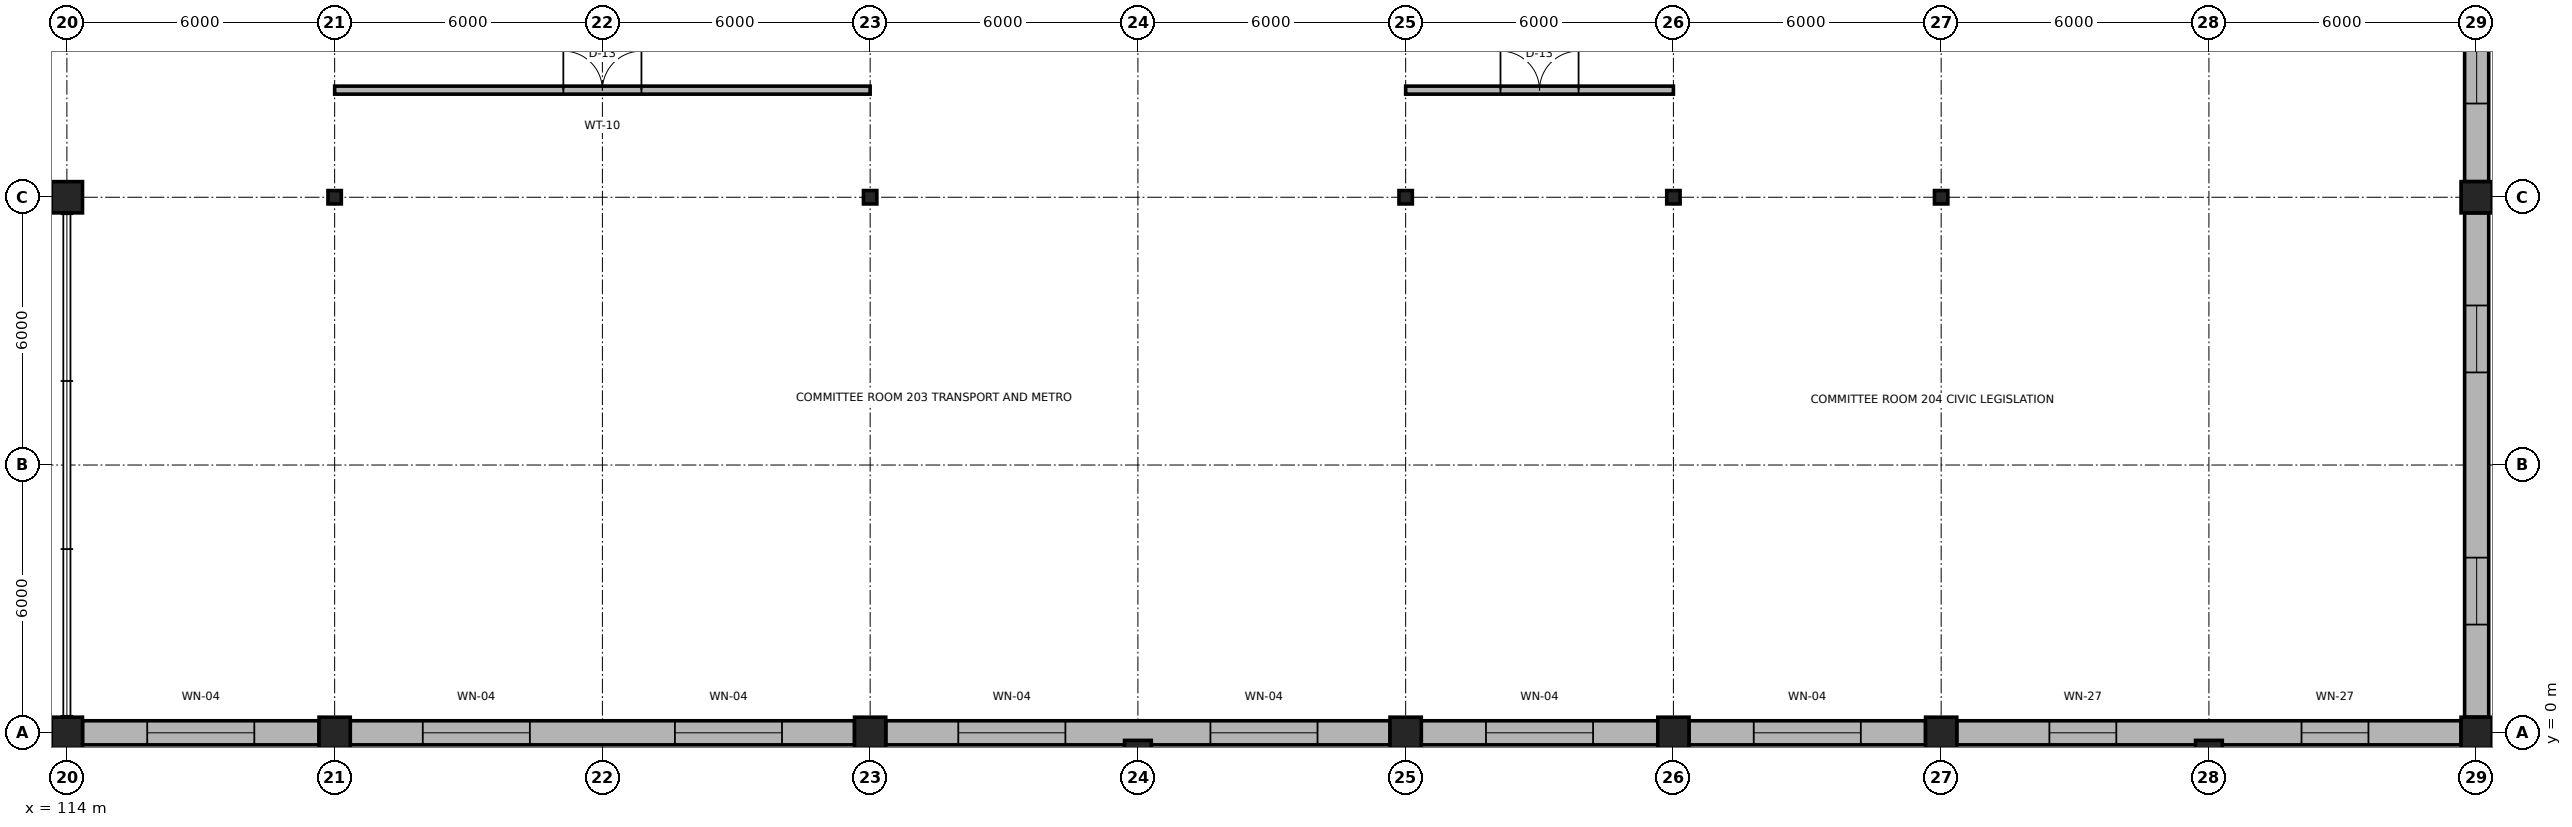
"""IFC4 building model, lengths in metres.
Left out: names, types, materials, properties, quantities, classifications, styles, units other than length and angle.
Written with IfcOpenShell. Run it as: python <this file> out.ifc"""

import sys

from ifc_helpers import new_model, si_unit, direction, frame, frame_2d, origin, origin_2d, place, context, subcontext, project, spatial, rectangle, i_section, extrude, element, fill, save


model = new_model("IFC4")
c1 = context("Model", 3, precision=1e-05, world=origin(), true_north=direction((0.0, 1.0)))
c2 = subcontext(c1, "Body", "Model", "MODEL_VIEW")
j1 = project(units=[si_unit("LENGTHUNIT", "METRE"), si_unit("PLANEANGLEUNIT", "RADIAN")], contexts=[c1])
p1 = place(None, origin())
s1 = spatial("IfcSite", under=j1, at=p1, CompositionType="ELEMENT")
p2 = place(p1, origin())
s2 = spatial("IfcBuilding", under=s1, at=p2, CompositionType="ELEMENT")
p3 = place(p2, frame((0.0, 0.0, 6.0)))
s3 = spatial("IfcBuildingStorey", under=s2, at=p3, CompositionType="ELEMENT", Elevation=6.0)
for number, where, z_axis, x_axis in (
    (1, (114.0, 0.0, 0.0), (0.0, 0.0, 1.0), (1.0, 0.0, 0.0)),
    (2, (120.0, 0.0, 0.0), (0.0, 0.0, 1.0), (1.0, 0.0, 0.0)),
    (3, (132.0, 0.0, 0.0), (0.0, 0.0, 1.0), (1.0, 0.0, 0.0)),
    (4, (144.0, 0.0, 0.0), (0.0, 0.0, 1.0), (1.0, 0.0, 0.0)),
    (5, (150.0, 0.0, 0.0), (0.0, 0.0, 1.0), (1.0, 0.0, 0.0)),
    (6, (156.0, 0.0, 0.0), (0.0, 0.0, 1.0), (1.0, 0.0, 0.0)),
    (7, (168.0, 0.0, 0.0), (0.0, 0.0, 1.0), (1.0, 0.0, 0.0)),
    (8, (114.0, 12.0, 0.0), (0.0, 0.0, 1.0), (1.0, 0.0, 0.0)),
):
    element("IfcColumn", number, at=place(p3, frame(where, z_axis=z_axis, x_axis=x_axis)), inside=s3, PredefinedType="COLUMN", context=c2, shape_type="SweptSolid", body=[
        extrude(rectangle(XDim=0.7, YDim=0.7, at=origin_2d()), origin(), (0.0, 0.0, 1.0), 6.0),
    ])
for number, where, z_axis, x_axis in (
    (9, (120.0, 12.0, 0.0), (0.0, 0.0, 1.0), (1.0, 0.0, 0.0)),
    (10, (132.0, 12.0, 0.0), (0.0, 0.0, 1.0), (1.0, 0.0, 0.0)),
    (11, (144.0, 12.0, 0.0), (0.0, 0.0, 1.0), (1.0, 0.0, 0.0)),
    (12, (150.0, 12.0, 0.0), (0.0, 0.0, 1.0), (1.0, 0.0, 0.0)),
    (13, (156.0, 12.0, 0.0), (0.0, 0.0, 1.0), (1.0, 0.0, 0.0)),
):
    element("IfcColumn", number, at=place(p3, frame(where, z_axis=z_axis, x_axis=x_axis)), inside=s3, PredefinedType="COLUMN", context=c2, shape_type="SweptSolid", body=[
        extrude(i_section(OverallWidth=0.3, OverallDepth=0.3, WebThickness=0.01, FlangeThickness=0.015, FilletRadius=0.018, at=origin_2d()), origin(), (0.0, 0.0, 1.0), 6.0),
    ])
p4 = place(p3, frame((168.0, 12.0, 0.0), z_axis=(0.0, 0.0, 1.0), x_axis=(1.0, 0.0, 0.0)))
e14 = element("IfcColumn", 14, at=p4, inside=s3, PredefinedType="COLUMN", context=c2, shape_type="SweptSolid", body=[
    extrude(rectangle(XDim=0.7, YDim=0.7, at=origin_2d()), origin(), (0.0, 0.0, 1.0), 6.0),
])
for number, where, z_axis, x_axis in (
    (15, (138.0, -0.35, 0.0), (0.0, 0.0, 1.0), (1.0, 0.0, 0.0)),
    (16, (162.0, -0.35, 0.0), (0.0, 0.0, 1.0), (1.0, 0.0, 0.0)),
):
    element("IfcColumn", number, at=place(p3, frame(where, z_axis=z_axis, x_axis=x_axis)), inside=s3, PredefinedType="PILASTER", context=c2, shape_type="SweptSolid", body=[
        extrude(rectangle(XDim=0.6, YDim=0.36, at=origin_2d()), origin(), (0.0, 0.0, 1.0), 6.0),
    ])
p5 = place(p3, frame((114.35, 0.0, 0.0), z_axis=(0.0, 0.0, 1.0), x_axis=(1.0, 0.0, 0.0)))
e17 = element("IfcWall", 17, at=p5, inside=s3, PredefinedType="SOLIDWALL", context=c2, shape_type="SweptSolid", body=[
    extrude(rectangle(XDim=5.3, YDim=0.54, at=frame_2d((2.65, 0.0))), origin(), (0.0, 0.0, 1.0), 5.31),
])
p6 = place(p5, frame((1.45, 0.0, 0.85)))
e18 = element("IfcOpeningElement", 18, at=p6, cuts=e17, PredefinedType="OPENING", context=c2, shape_type="SweptSolid", body=[
    extrude(rectangle(XDim=2.4, YDim=3.8, at=frame_2d((1.2, 1.9))), frame((0.0, 0.285, 0.0), z_axis=(0.0, -1.0, 0.0), x_axis=(1.0, 0.0, 0.0)), (0.0, 0.0, 1.0), 0.57),
])
p7 = place(p3, frame((120.35, 0.0, 0.0), z_axis=(0.0, 0.0, 1.0), x_axis=(1.0, 0.0, 0.0)))
e19 = element("IfcWall", 19, at=p7, inside=s3, PredefinedType="SOLIDWALL", context=c2, shape_type="SweptSolid", body=[
    extrude(rectangle(XDim=11.3, YDim=0.54, at=frame_2d((5.65, 0.0))), origin(), (0.0, 0.0, 1.0), 5.31),
])
p8 = place(p7, frame((1.625, 0.0, 0.85)))
e20 = element("IfcOpeningElement", 20, at=p8, cuts=e19, PredefinedType="OPENING", context=c2, shape_type="SweptSolid", body=[
    extrude(rectangle(XDim=2.4, YDim=3.8, at=frame_2d((1.2, 1.9))), frame((0.0, 0.285, 0.0), z_axis=(0.0, -1.0, 0.0), x_axis=(1.0, 0.0, 0.0)), (0.0, 0.0, 1.0), 0.57),
])
p9 = place(p7, frame((7.275, 0.0, 0.85)))
e21 = element("IfcOpeningElement", 21, at=p9, cuts=e19, PredefinedType="OPENING", context=c2, shape_type="SweptSolid", body=[
    extrude(rectangle(XDim=2.4, YDim=3.8, at=frame_2d((1.2, 1.9))), frame((0.0, 0.285, 0.0), z_axis=(0.0, -1.0, 0.0), x_axis=(1.0, 0.0, 0.0)), (0.0, 0.0, 1.0), 0.57),
])
p10 = place(p3, frame((132.35, 0.0, 0.0), z_axis=(0.0, 0.0, 1.0), x_axis=(1.0, 0.0, 0.0)))
e22 = element("IfcWall", 22, at=p10, inside=s3, PredefinedType="SOLIDWALL", context=c2, shape_type="SweptSolid", body=[
    extrude(rectangle(XDim=11.3, YDim=0.54, at=frame_2d((5.65, 0.0))), origin(), (0.0, 0.0, 1.0), 5.31),
])
p11 = place(p10, frame((1.625, 0.0, 0.85)))
e23 = element("IfcOpeningElement", 23, at=p11, cuts=e22, PredefinedType="OPENING", context=c2, shape_type="SweptSolid", body=[
    extrude(rectangle(XDim=2.4, YDim=3.8, at=frame_2d((1.2, 1.9))), frame((0.0, 0.285, 0.0), z_axis=(0.0, -1.0, 0.0), x_axis=(1.0, 0.0, 0.0)), (0.0, 0.0, 1.0), 0.57),
])
p12 = place(p10, frame((7.275, 0.0, 0.85)))
e24 = element("IfcOpeningElement", 24, at=p12, cuts=e22, PredefinedType="OPENING", context=c2, shape_type="SweptSolid", body=[
    extrude(rectangle(XDim=2.4, YDim=3.8, at=frame_2d((1.2, 1.9))), frame((0.0, 0.285, 0.0), z_axis=(0.0, -1.0, 0.0), x_axis=(1.0, 0.0, 0.0)), (0.0, 0.0, 1.0), 0.57),
])
p13 = place(p3, frame((144.35, 0.0, 0.0), z_axis=(0.0, 0.0, 1.0), x_axis=(1.0, 0.0, 0.0)))
e25 = element("IfcWall", 25, at=p13, inside=s3, PredefinedType="SOLIDWALL", context=c2, shape_type="SweptSolid", body=[
    extrude(rectangle(XDim=5.3, YDim=0.54, at=frame_2d((2.65, 0.0))), origin(), (0.0, 0.0, 1.0), 5.31),
])
p14 = place(p13, frame((1.45, 0.0, 0.85)))
e26 = element("IfcOpeningElement", 26, at=p14, cuts=e25, PredefinedType="OPENING", context=c2, shape_type="SweptSolid", body=[
    extrude(rectangle(XDim=2.4, YDim=3.8, at=frame_2d((1.2, 1.9))), frame((0.0, 0.285, 0.0), z_axis=(0.0, -1.0, 0.0), x_axis=(1.0, 0.0, 0.0)), (0.0, 0.0, 1.0), 0.57),
])
p15 = place(p3, frame((150.35, 0.0, 0.0), z_axis=(0.0, 0.0, 1.0), x_axis=(1.0, 0.0, 0.0)))
e27 = element("IfcWall", 27, at=p15, inside=s3, PredefinedType="SOLIDWALL", context=c2, shape_type="SweptSolid", body=[
    extrude(rectangle(XDim=5.3, YDim=0.54, at=frame_2d((2.65, 0.0))), origin(), (0.0, 0.0, 1.0), 5.31),
])
p16 = place(p15, frame((1.45, 0.0, 0.85)))
e28 = element("IfcOpeningElement", 28, at=p16, cuts=e27, PredefinedType="OPENING", context=c2, shape_type="SweptSolid", body=[
    extrude(rectangle(XDim=2.4, YDim=3.8, at=frame_2d((1.2, 1.9))), frame((0.0, 0.285, 0.0), z_axis=(0.0, -1.0, 0.0), x_axis=(1.0, 0.0, 0.0)), (0.0, 0.0, 1.0), 0.57),
])
p17 = place(p3, frame((156.35, 0.0, 0.0), z_axis=(0.0, 0.0, 1.0), x_axis=(1.0, 0.0, 0.0)))
e29 = element("IfcWall", 29, at=p17, inside=s3, PredefinedType="SOLIDWALL", context=c2, shape_type="SweptSolid", body=[
    extrude(rectangle(XDim=11.3, YDim=0.54, at=frame_2d((5.65, 0.0))), origin(), (0.0, 0.0, 1.0), 5.31),
])
p18 = place(p17, frame((2.075, 0.0, 0.85)))
e30 = element("IfcOpeningElement", 30, at=p18, cuts=e29, PredefinedType="OPENING", context=c2, shape_type="SweptSolid", body=[
    extrude(rectangle(XDim=1.5, YDim=2.8, at=frame_2d((0.75, 1.4))), frame((0.0, 0.285, 0.0), z_axis=(0.0, -1.0, 0.0), x_axis=(1.0, 0.0, 0.0)), (0.0, 0.0, 1.0), 0.57),
])
p19 = place(p17, frame((7.725, 0.0, 0.85)))
e31 = element("IfcOpeningElement", 31, at=p19, cuts=e29, PredefinedType="OPENING", context=c2, shape_type="SweptSolid", body=[
    extrude(rectangle(XDim=1.5, YDim=2.8, at=frame_2d((0.75, 1.4))), frame((0.0, 0.285, 0.0), z_axis=(0.0, -1.0, 0.0), x_axis=(1.0, 0.0, 0.0)), (0.0, 0.0, 1.0), 0.57),
])
p20 = place(p3, frame((168.0, 0.35, 0.0), z_axis=(0.0, 0.0, 1.0), x_axis=(0.0, 1.0, 0.0)))
e32 = element("IfcWall", 32, at=p20, inside=s3, PredefinedType="SOLIDWALL", context=c2, shape_type="SweptSolid", body=[
    extrude(rectangle(XDim=11.3, YDim=0.54, at=frame_2d((5.65, 0.0))), origin(), (0.0, 0.0, 1.0), 5.31),
])
p21 = place(p20, frame((2.075, 0.0, 0.85)))
e33 = element("IfcOpeningElement", 33, at=p21, cuts=e32, PredefinedType="OPENING", context=c2, shape_type="SweptSolid", body=[
    extrude(rectangle(XDim=1.5, YDim=2.8, at=frame_2d((0.75, 1.4))), frame((0.0, 0.285, 0.0), z_axis=(0.0, -1.0, 0.0), x_axis=(1.0, 0.0, 0.0)), (0.0, 0.0, 1.0), 0.57),
])
p22 = place(p20, frame((7.725, 0.0, 0.85)))
e34 = element("IfcOpeningElement", 34, at=p22, cuts=e32, PredefinedType="OPENING", context=c2, shape_type="SweptSolid", body=[
    extrude(rectangle(XDim=1.5, YDim=2.8, at=frame_2d((0.75, 1.4))), frame((0.0, 0.285, 0.0), z_axis=(0.0, -1.0, 0.0), x_axis=(1.0, 0.0, 0.0)), (0.0, 0.0, 1.0), 0.57),
])
p23 = place(p3, frame((168.0, 12.35, 0.0), z_axis=(0.0, 0.0, 1.0), x_axis=(0.0, 1.0, 0.0)))
e35 = element("IfcWall", 35, at=p23, inside=s3, PredefinedType="SOLIDWALL", context=c2, shape_type="SweptSolid", body=[
    extrude(rectangle(XDim=5.3, YDim=0.54, at=frame_2d((2.65, 0.0))), origin(), (0.0, 0.0, 1.0), 5.31),
])
p24 = place(p23, frame((1.75, 0.0, 0.85)))
e36 = element("IfcOpeningElement", 36, at=p24, cuts=e35, PredefinedType="OPENING", context=c2, shape_type="SweptSolid", body=[
    extrude(rectangle(XDim=1.8, YDim=3.3, at=frame_2d((0.9, 1.65))), frame((0.0, 0.285, 0.0), z_axis=(0.0, -1.0, 0.0), x_axis=(1.0, 0.0, 0.0)), (0.0, 0.0, 1.0), 0.57),
])
p25 = place(p3, frame((120.0, 14.4, 0.0), z_axis=(0.0, 0.0, 1.0), x_axis=(1.0, 0.0, 0.0)))
e37 = element("IfcWall", 37, at=p25, inside=s3, PredefinedType="PARTITIONING", context=c2, shape_type="SweptSolid", body=[
    extrude(rectangle(XDim=12.0, YDim=0.18, at=frame_2d((6.0, 0.0))), origin(), (0.0, 0.0, 1.0), 5.76),
])
p26 = place(p25, frame((5.125, 0.0, 0.0)))
e38 = element("IfcOpeningElement", 38, at=p26, cuts=e37, PredefinedType="OPENING", context=c2, shape_type="SweptSolid", body=[
    extrude(rectangle(XDim=1.75, YDim=2.55, at=frame_2d((0.875, 1.275))), frame((0.0, 0.105, 0.0), z_axis=(0.0, -1.0, 0.0), x_axis=(1.0, 0.0, 0.0)), (0.0, 0.0, 1.0), 0.21),
])
p27 = place(p3, frame((144.0, 14.4, 0.0), z_axis=(0.0, 0.0, 1.0), x_axis=(1.0, 0.0, 0.0)))
e39 = element("IfcWall", 39, at=p27, inside=s3, PredefinedType="PARTITIONING", context=c2, shape_type="SweptSolid", body=[
    extrude(rectangle(XDim=6.0, YDim=0.18, at=frame_2d((3.0, 0.0))), origin(), (0.0, 0.0, 1.0), 5.76),
])
p28 = place(p27, frame((2.125, 0.0, 0.0)))
e40 = element("IfcOpeningElement", 40, at=p28, cuts=e39, PredefinedType="OPENING", context=c2, shape_type="SweptSolid", body=[
    extrude(rectangle(XDim=1.75, YDim=2.55, at=frame_2d((0.875, 1.275))), frame((0.0, 0.105, 0.0), z_axis=(0.0, -1.0, 0.0), x_axis=(1.0, 0.0, 0.0)), (0.0, 0.0, 1.0), 0.21),
])
p29 = place(p6, origin())
e41 = element("IfcWindow", 41, at=p29, inside=s3, PartitioningType="SINGLE_PANEL", PredefinedType="WINDOW", context=c2, shape_type="SweptSolid", body=[
    extrude(rectangle(XDim=2.4, YDim=3.8, at=frame_2d((1.2, 1.9))), frame((0.0, 0.03, 0.0), z_axis=(0.0, -1.0, 0.0), x_axis=(1.0, 0.0, 0.0)), (0.0, 0.0, 1.0), 0.06),
])
fill(e18, e41)
p30 = place(p8, origin())
e42 = element("IfcWindow", 42, at=p30, inside=s3, PartitioningType="SINGLE_PANEL", PredefinedType="WINDOW", context=c2, shape_type="SweptSolid", body=[
    extrude(rectangle(XDim=2.4, YDim=3.8, at=frame_2d((1.2, 1.9))), frame((0.0, 0.03, 0.0), z_axis=(0.0, -1.0, 0.0), x_axis=(1.0, 0.0, 0.0)), (0.0, 0.0, 1.0), 0.06),
])
fill(e20, e42)
p31 = place(p9, origin())
e43 = element("IfcWindow", 43, at=p31, inside=s3, PartitioningType="SINGLE_PANEL", PredefinedType="WINDOW", context=c2, shape_type="SweptSolid", body=[
    extrude(rectangle(XDim=2.4, YDim=3.8, at=frame_2d((1.2, 1.9))), frame((0.0, 0.03, 0.0), z_axis=(0.0, -1.0, 0.0), x_axis=(1.0, 0.0, 0.0)), (0.0, 0.0, 1.0), 0.06),
])
fill(e21, e43)
p32 = place(p11, origin())
e44 = element("IfcWindow", 44, at=p32, inside=s3, PartitioningType="SINGLE_PANEL", PredefinedType="WINDOW", context=c2, shape_type="SweptSolid", body=[
    extrude(rectangle(XDim=2.4, YDim=3.8, at=frame_2d((1.2, 1.9))), frame((0.0, 0.03, 0.0), z_axis=(0.0, -1.0, 0.0), x_axis=(1.0, 0.0, 0.0)), (0.0, 0.0, 1.0), 0.06),
])
fill(e23, e44)
p33 = place(p12, origin())
e45 = element("IfcWindow", 45, at=p33, inside=s3, PartitioningType="SINGLE_PANEL", PredefinedType="WINDOW", context=c2, shape_type="SweptSolid", body=[
    extrude(rectangle(XDim=2.4, YDim=3.8, at=frame_2d((1.2, 1.9))), frame((0.0, 0.03, 0.0), z_axis=(0.0, -1.0, 0.0), x_axis=(1.0, 0.0, 0.0)), (0.0, 0.0, 1.0), 0.06),
])
fill(e24, e45)
p34 = place(p14, origin())
e46 = element("IfcWindow", 46, at=p34, inside=s3, PartitioningType="SINGLE_PANEL", PredefinedType="WINDOW", context=c2, shape_type="SweptSolid", body=[
    extrude(rectangle(XDim=2.4, YDim=3.8, at=frame_2d((1.2, 1.9))), frame((0.0, 0.03, 0.0), z_axis=(0.0, -1.0, 0.0), x_axis=(1.0, 0.0, 0.0)), (0.0, 0.0, 1.0), 0.06),
])
fill(e26, e46)
p35 = place(p16, origin())
e47 = element("IfcWindow", 47, at=p35, inside=s3, PartitioningType="SINGLE_PANEL", PredefinedType="WINDOW", context=c2, shape_type="SweptSolid", body=[
    extrude(rectangle(XDim=2.4, YDim=3.8, at=frame_2d((1.2, 1.9))), frame((0.0, 0.03, 0.0), z_axis=(0.0, -1.0, 0.0), x_axis=(1.0, 0.0, 0.0)), (0.0, 0.0, 1.0), 0.06),
])
fill(e28, e47)
p36 = place(p18, origin())
e48 = element("IfcWindow", 48, at=p36, inside=s3, PartitioningType="SINGLE_PANEL", PredefinedType="WINDOW", context=c2, shape_type="SweptSolid", body=[
    extrude(rectangle(XDim=1.5, YDim=2.8, at=frame_2d((0.75, 1.4))), frame((0.0, 0.03, 0.0), z_axis=(0.0, -1.0, 0.0), x_axis=(1.0, 0.0, 0.0)), (0.0, 0.0, 1.0), 0.06),
])
fill(e30, e48)
p37 = place(p19, origin())
e49 = element("IfcWindow", 49, at=p37, inside=s3, PartitioningType="SINGLE_PANEL", PredefinedType="WINDOW", context=c2, shape_type="SweptSolid", body=[
    extrude(rectangle(XDim=1.5, YDim=2.8, at=frame_2d((0.75, 1.4))), frame((0.0, 0.03, 0.0), z_axis=(0.0, -1.0, 0.0), x_axis=(1.0, 0.0, 0.0)), (0.0, 0.0, 1.0), 0.06),
])
fill(e31, e49)
p38 = place(p21, origin())
e50 = element("IfcWindow", 50, at=p38, inside=s3, PartitioningType="SINGLE_PANEL", PredefinedType="WINDOW", context=c2, shape_type="SweptSolid", body=[
    extrude(rectangle(XDim=1.5, YDim=2.8, at=frame_2d((0.75, 1.4))), frame((0.0, 0.03, 0.0), z_axis=(0.0, -1.0, 0.0), x_axis=(1.0, 0.0, 0.0)), (0.0, 0.0, 1.0), 0.06),
])
fill(e33, e50)
p39 = place(p22, origin())
e51 = element("IfcWindow", 51, at=p39, inside=s3, PartitioningType="SINGLE_PANEL", PredefinedType="WINDOW", context=c2, shape_type="SweptSolid", body=[
    extrude(rectangle(XDim=1.5, YDim=2.8, at=frame_2d((0.75, 1.4))), frame((0.0, 0.03, 0.0), z_axis=(0.0, -1.0, 0.0), x_axis=(1.0, 0.0, 0.0)), (0.0, 0.0, 1.0), 0.06),
])
fill(e34, e51)
p40 = place(p24, origin())
e52 = element("IfcWindow", 52, at=p40, inside=s3, PartitioningType="SINGLE_PANEL", PredefinedType="WINDOW", context=c2, shape_type="SweptSolid", body=[
    extrude(rectangle(XDim=1.8, YDim=3.3, at=frame_2d((0.9, 1.65))), frame((0.0, 0.03, 0.0), z_axis=(0.0, -1.0, 0.0), x_axis=(1.0, 0.0, 0.0)), (0.0, 0.0, 1.0), 0.06),
])
fill(e36, e52)
p41 = place(p26, origin())
e53 = element("IfcDoor", 53, at=p41, inside=s3, OperationType="DOUBLE_DOOR_SINGLE_SWING", PredefinedType="DOOR", context=c2, shape_type="SweptSolid", body=[
    extrude(rectangle(XDim=1.75, YDim=2.55, at=frame_2d((0.875, 1.275))), frame((0.0, 0.025, 0.0), z_axis=(0.0, -1.0, 0.0), x_axis=(1.0, 0.0, 0.0)), (0.0, 0.0, 1.0), 0.05),
])
fill(e38, e53)
p42 = place(p28, origin())
e54 = element("IfcDoor", 54, at=p42, inside=s3, OperationType="DOUBLE_DOOR_SINGLE_SWING", PredefinedType="DOOR", context=c2, shape_type="SweptSolid", body=[
    extrude(rectangle(XDim=1.75, YDim=2.55, at=frame_2d((0.875, 1.275))), frame((0.0, 0.025, 0.0), z_axis=(0.0, -1.0, 0.0), x_axis=(1.0, 0.0, 0.0)), (0.0, 0.0, 1.0), 0.05),
])
fill(e40, e54)
save(model, sys.argv[1])
